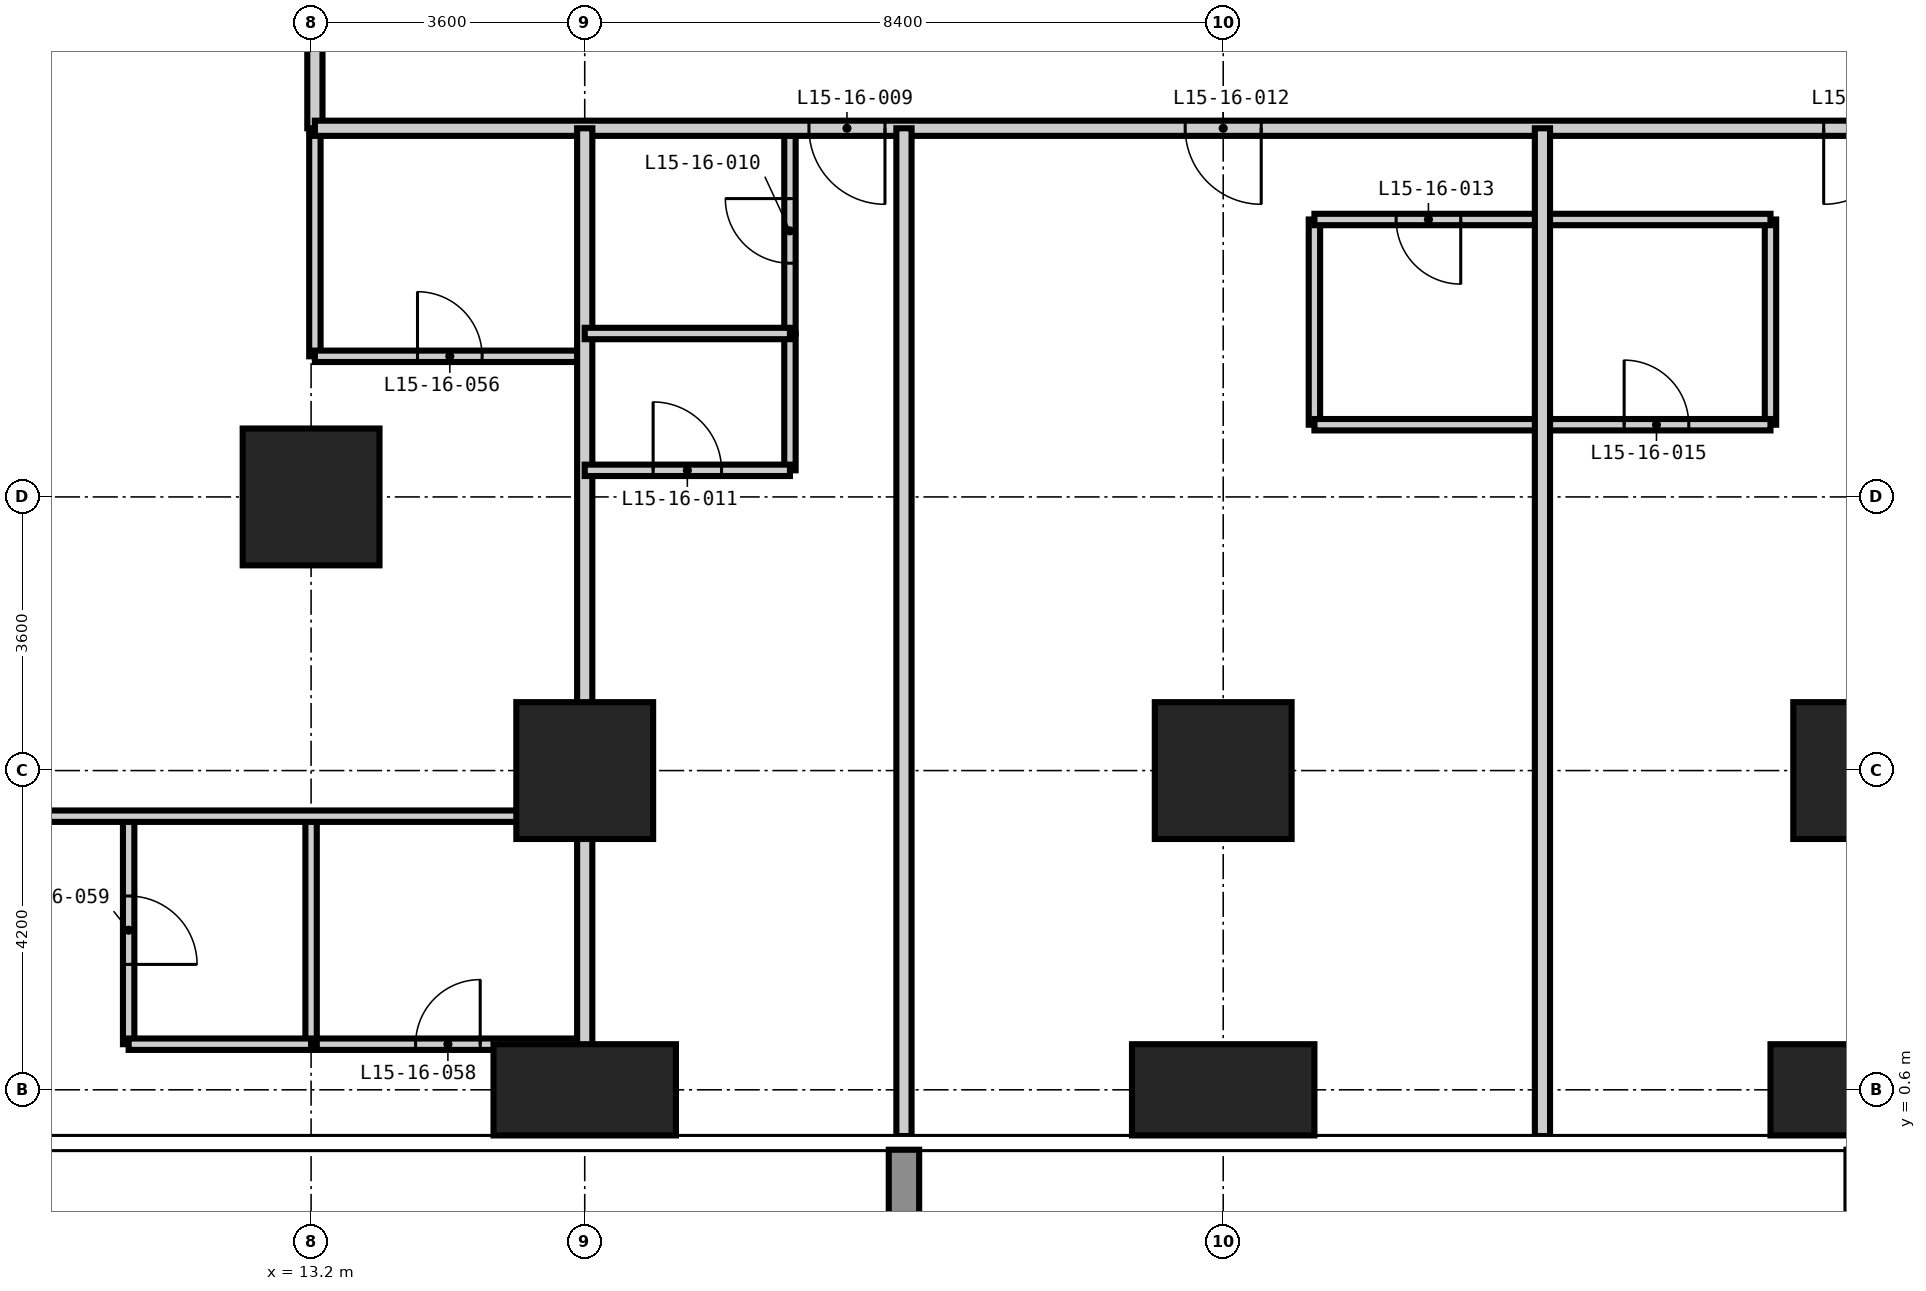
"""IFC4 building model, lengths in metres.
Left out: names, types, materials, properties, quantities, classifications, styles, units other than length and angle.
Written with IfcOpenShell. Run it as: python <this file> out.ifc"""

import sys

from ifc_helpers import new_model, si_unit, direction, frame, frame_2d, origin, origin_2d, place, context, subcontext, project, spatial, rectangle, extrude, element, fill, save


model = new_model("IFC4")
c1 = context("Model", 3, precision=1e-05, world=origin(), true_north=direction((0.0, 1.0)))
c2 = subcontext(c1, "Body", "Model", "MODEL_VIEW")
j1 = project(units=[si_unit("LENGTHUNIT", "METRE"), si_unit("PLANEANGLEUNIT", "RADIAN")], contexts=[c1])
p1 = place(None, origin())
s1 = spatial("IfcSite", under=j1, at=p1, CompositionType="ELEMENT")
p2 = place(p1, origin())
s2 = spatial("IfcBuilding", under=s1, at=p2, CompositionType="ELEMENT")
p3 = place(p2, frame((0.0, 0.0, 63.0)))
s3 = spatial("IfcBuildingStorey", under=s2, at=p3, CompositionType="ELEMENT", Elevation=63.0)
p4 = place(p3, frame((13.2, 8.4, -0.35), z_axis=(0.0, 0.0, 1.0), x_axis=(1.0, 0.0, 0.0)))
e1 = element("IfcColumn", 1, at=p4, inside=s3, PredefinedType="COLUMN", context=c2, shape_type="SweptSolid", body=[
    extrude(rectangle(XDim=1.8, YDim=1.8, at=origin_2d()), origin(), (0.0, 0.0, 1.0), 3.6),
])
p5 = place(p3, frame((16.8, 0.6, -0.35), z_axis=(0.0, 0.0, 1.0), x_axis=(1.0, 0.0, 0.0)))
e2 = element("IfcColumn", 2, at=p5, inside=s3, PredefinedType="COLUMN", context=c2, shape_type="SweptSolid", body=[
    extrude(rectangle(XDim=2.4, YDim=1.2, at=origin_2d()), origin(), (0.0, 0.0, 1.0), 3.6),
])
p6 = place(p3, frame((16.8, 4.8, -0.35), z_axis=(0.0, 0.0, 1.0), x_axis=(1.0, 0.0, 0.0)))
e3 = element("IfcColumn", 3, at=p6, inside=s3, PredefinedType="COLUMN", context=c2, shape_type="SweptSolid", body=[
    extrude(rectangle(XDim=1.8, YDim=1.8, at=origin_2d()), origin(), (0.0, 0.0, 1.0), 3.6),
])
p7 = place(p3, frame((25.2, 0.6, -0.35), z_axis=(0.0, 0.0, 1.0), x_axis=(1.0, 0.0, 0.0)))
e4 = element("IfcColumn", 4, at=p7, inside=s3, PredefinedType="COLUMN", context=c2, shape_type="SweptSolid", body=[
    extrude(rectangle(XDim=2.4, YDim=1.2, at=origin_2d()), origin(), (0.0, 0.0, 1.0), 3.6),
])
p8 = place(p3, frame((25.2, 4.8, -0.35), z_axis=(0.0, 0.0, 1.0), x_axis=(1.0, 0.0, 0.0)))
e5 = element("IfcColumn", 5, at=p8, inside=s3, PredefinedType="COLUMN", context=c2, shape_type="SweptSolid", body=[
    extrude(rectangle(XDim=1.8, YDim=1.8, at=origin_2d()), origin(), (0.0, 0.0, 1.0), 3.6),
])
p9 = place(p3, frame((33.6, 0.6, -0.35), z_axis=(0.0, 0.0, 1.0), x_axis=(1.0, 0.0, 0.0)))
e6 = element("IfcColumn", 6, at=p9, inside=s3, PredefinedType="COLUMN", context=c2, shape_type="SweptSolid", body=[
    extrude(rectangle(XDim=2.4, YDim=1.2, at=origin_2d()), origin(), (0.0, 0.0, 1.0), 3.6),
])
p10 = place(p3, frame((33.6, 4.8, -0.35), z_axis=(0.0, 0.0, 1.0), x_axis=(1.0, 0.0, 0.0)))
e7 = element("IfcColumn", 7, at=p10, inside=s3, PredefinedType="COLUMN", context=c2, shape_type="SweptSolid", body=[
    extrude(rectangle(XDim=1.8, YDim=1.8, at=origin_2d()), origin(), (0.0, 0.0, 1.0), 3.6),
])
p11 = place(p3, frame((13.25, 10.25, 0.0), z_axis=(0.0, 0.0, 1.0), x_axis=(0.0, 1.0, 0.0)))
e8 = element("IfcWall", 8, at=p11, inside=s3, PredefinedType="PARTITIONING", context=c2, shape_type="SweptSolid", body=[
    extrude(rectangle(XDim=3.0, YDim=0.15, at=frame_2d((1.5, 0.0))), origin(), (0.0, 0.0, 1.0), 3.25),
])
p12 = place(p3, frame((19.5, 10.55, 0.0), z_axis=(0.0, 0.0, 1.0), x_axis=(0.0, 1.0, 0.0)))
e9 = element("IfcWall", 9, at=p12, inside=s3, PredefinedType="PARTITIONING", context=c2, shape_type="SweptSolid", body=[
    extrude(rectangle(XDim=2.7, YDim=0.15, at=frame_2d((1.35, 0.0))), origin(), (0.0, 0.0, 1.0), 3.25),
])
p13 = place(p12, frame((0.925, 0.0, 0.0)))
e10 = element("IfcOpeningElement", 10, at=p13, cuts=e9, PredefinedType="OPENING", context=c2, shape_type="SweptSolid", body=[
    extrude(rectangle(XDim=0.85, YDim=2.1, at=frame_2d((0.425, 1.05))), frame((0.0, 0.085, 0.0), z_axis=(0.0, -1.0, 0.0), x_axis=(1.0, 0.0, 0.0)), (0.0, 0.0, 1.0), 0.17),
])
for number, where, z_axis, x_axis in (
    (11, (26.4, 9.35, 0.0), (0.0, 0.0, 1.0), (0.0, 1.0, 0.0)),
    (12, (32.4, 9.35, 0.0), (0.0, 0.0, 1.0), (0.0, 1.0, 0.0)),
):
    element("IfcWall", number, at=place(p3, frame(where, z_axis=z_axis, x_axis=x_axis)), inside=s3, PredefinedType="PARTITIONING", context=c2, shape_type="SweptSolid", body=[
        extrude(rectangle(XDim=2.7, YDim=0.15, at=frame_2d((1.35, 0.0))), origin(), (0.0, 0.0, 1.0), 3.25),
    ])
p14 = place(p3, frame((13.2, 1.2, 0.0), z_axis=(0.0, 0.0, 1.0), x_axis=(1.0, 0.0, 0.0)))
e13 = element("IfcWall", 13, at=p14, inside=s3, PredefinedType="PARTITIONING", context=c2, shape_type="SweptSolid", body=[
    extrude(rectangle(XDim=3.6, YDim=0.15, at=frame_2d((1.8, 0.0))), origin(), (0.0, 0.0, 1.0), 3.25),
])
p15 = place(p14, frame((1.375, 0.0, 0.0)))
e14 = element("IfcOpeningElement", 14, at=p15, cuts=e13, PredefinedType="OPENING", context=c2, shape_type="SweptSolid", body=[
    extrude(rectangle(XDim=0.85, YDim=2.1, at=frame_2d((0.425, 1.05))), frame((0.0, 0.085, 0.0), z_axis=(0.0, -1.0, 0.0), x_axis=(1.0, 0.0, 0.0)), (0.0, 0.0, 1.0), 0.17),
])
p16 = place(p3, frame((26.4, 9.35, 0.0), z_axis=(0.0, 0.0, 1.0), x_axis=(1.0, 0.0, 0.0)))
e15 = element("IfcWall", 15, at=p16, inside=s3, PredefinedType="PARTITIONING", context=c2, shape_type="SweptSolid", body=[
    extrude(rectangle(XDim=6.0, YDim=0.15, at=frame_2d((3.0, 0.0))), origin(), (0.0, 0.0, 1.0), 3.25),
])
p17 = place(p16, frame((4.075, 0.0, 0.0)))
e16 = element("IfcOpeningElement", 16, at=p17, cuts=e15, PredefinedType="OPENING", context=c2, shape_type="SweptSolid", body=[
    extrude(rectangle(XDim=0.85, YDim=2.1, at=frame_2d((0.425, 1.05))), frame((0.0, 0.085, 0.0), z_axis=(0.0, -1.0, 0.0), x_axis=(1.0, 0.0, 0.0)), (0.0, 0.0, 1.0), 0.17),
])
p18 = place(p3, frame((13.25, 10.25, 0.0), z_axis=(0.0, 0.0, 1.0), x_axis=(1.0, 0.0, 0.0)))
e17 = element("IfcWall", 17, at=p18, inside=s3, PredefinedType="PARTITIONING", context=c2, shape_type="SweptSolid", body=[
    extrude(rectangle(XDim=3.55, YDim=0.15, at=frame_2d((1.775, 0.0))), origin(), (0.0, 0.0, 1.0), 3.25),
])
p19 = place(p18, frame((1.35, 0.0, 0.0)))
e18 = element("IfcOpeningElement", 18, at=p19, cuts=e17, PredefinedType="OPENING", context=c2, shape_type="SweptSolid", body=[
    extrude(rectangle(XDim=0.85, YDim=2.1, at=frame_2d((0.425, 1.05))), frame((0.0, 0.085, 0.0), z_axis=(0.0, -1.0, 0.0), x_axis=(1.0, 0.0, 0.0)), (0.0, 0.0, 1.0), 0.17),
])
p20 = place(p3, frame((26.4, 12.05, 0.0), z_axis=(0.0, 0.0, 1.0), x_axis=(1.0, 0.0, 0.0)))
e19 = element("IfcWall", 19, at=p20, inside=s3, PredefinedType="PARTITIONING", context=c2, shape_type="SweptSolid", body=[
    extrude(rectangle(XDim=6.0, YDim=0.15, at=frame_2d((3.0, 0.0))), origin(), (0.0, 0.0, 1.0), 3.25),
])
p21 = place(p20, frame((1.075, 0.0, 0.0)))
e20 = element("IfcOpeningElement", 20, at=p21, cuts=e19, PredefinedType="OPENING", context=c2, shape_type="SweptSolid", body=[
    extrude(rectangle(XDim=0.85, YDim=2.1, at=frame_2d((0.425, 1.05))), frame((0.0, 0.085, 0.0), z_axis=(0.0, -1.0, 0.0), x_axis=(1.0, 0.0, 0.0)), (0.0, 0.0, 1.0), 0.17),
])
p22 = place(p3, frame((13.25, 13.25, 0.0), z_axis=(0.0, 0.0, 1.0), x_axis=(0.0, 1.0, 0.0)))
e21 = element("IfcWall", 21, at=p22, inside=s3, PredefinedType="PARTITIONING", context=c2, shape_type="SweptSolid", body=[
    extrude(rectangle(XDim=31.7, YDim=0.2, at=frame_2d((15.85, 0.0))), origin(), (0.0, 0.0, 1.0), 3.25),
])
p23 = place(p22, frame((7.25, 0.0, 0.0)))
e22 = element("IfcOpeningElement", 22, at=p23, cuts=e21, PredefinedType="OPENING", context=c2, shape_type="SweptSolid", body=[
    extrude(rectangle(XDim=1.0, YDim=2.2, at=frame_2d((0.5, 1.1))), frame((0.0, 0.11, 0.0), z_axis=(0.0, -1.0, 0.0), x_axis=(1.0, 0.0, 0.0)), (0.0, 0.0, 1.0), 0.22),
])
p24 = place(p22, frame((15.65, 0.0, 0.0)))
e23 = element("IfcOpeningElement", 23, at=p24, cuts=e21, PredefinedType="OPENING", context=c2, shape_type="SweptSolid", body=[
    extrude(rectangle(XDim=1.0, YDim=2.2, at=frame_2d((0.5, 1.1))), frame((0.0, 0.11, 0.0), z_axis=(0.0, -1.0, 0.0), x_axis=(1.0, 0.0, 0.0)), (0.0, 0.0, 1.0), 0.22),
])
p25 = place(p22, frame((24.05, 0.0, 0.0)))
e24 = element("IfcOpeningElement", 24, at=p25, cuts=e21, PredefinedType="OPENING", context=c2, shape_type="SweptSolid", body=[
    extrude(rectangle(XDim=1.0, YDim=2.2, at=frame_2d((0.5, 1.1))), frame((0.0, 0.11, 0.0), z_axis=(0.0, -1.0, 0.0), x_axis=(1.0, 0.0, 0.0)), (0.0, 0.0, 1.0), 0.22),
])
p26 = place(p22, frame((1.275, 0.0, 0.0)))
e25 = element("IfcOpeningElement", 25, at=p26, cuts=e21, PredefinedType="OPENING", context=c2, shape_type="SweptSolid", body=[
    extrude(rectangle(XDim=1.0, YDim=2.2, at=frame_2d((0.5, 1.1))), frame((0.0, 0.11, 0.0), z_axis=(0.0, -1.0, 0.0), x_axis=(1.0, 0.0, 0.0)), (0.0, 0.0, 1.0), 0.22),
])
p27 = place(p22, frame((29.725, 0.0, 0.0)))
e26 = element("IfcOpeningElement", 26, at=p27, cuts=e21, PredefinedType="OPENING", context=c2, shape_type="SweptSolid", body=[
    extrude(rectangle(XDim=1.0, YDim=2.2, at=frame_2d((0.5, 1.1))), frame((0.0, 0.11, 0.0), z_axis=(0.0, -1.0, 0.0), x_axis=(1.0, 0.0, 0.0)), (0.0, 0.0, 1.0), 0.22),
])
p28 = place(p3, frame((46.15, 13.25, 0.0), z_axis=(0.0, 0.0, 1.0), x_axis=(-1.0, 0.0, 0.0)))
e27 = element("IfcWall", 27, at=p28, inside=s3, PredefinedType="PARTITIONING", context=c2, shape_type="SweptSolid", body=[
    extrude(rectangle(XDim=32.9, YDim=0.2, at=frame_2d((16.45, 0.0))), origin(), (0.0, 0.0, 1.0), 3.25),
])
p29 = place(p28, frame((25.4, 0.0, 0.0)))
e28 = element("IfcOpeningElement", 28, at=p29, cuts=e27, PredefinedType="OPENING", context=c2, shape_type="SweptSolid", body=[
    extrude(rectangle(XDim=1.0, YDim=2.2, at=frame_2d((0.5, 1.1))), frame((0.0, 0.11, 0.0), z_axis=(0.0, -1.0, 0.0), x_axis=(1.0, 0.0, 0.0)), (0.0, 0.0, 1.0), 0.22),
])
p30 = place(p28, frame((20.45, 0.0, 0.0)))
e29 = element("IfcOpeningElement", 29, at=p30, cuts=e27, PredefinedType="OPENING", context=c2, shape_type="SweptSolid", body=[
    extrude(rectangle(XDim=1.0, YDim=2.2, at=frame_2d((0.5, 1.1))), frame((0.0, 0.11, 0.0), z_axis=(0.0, -1.0, 0.0), x_axis=(1.0, 0.0, 0.0)), (0.0, 0.0, 1.0), 0.22),
])
p31 = place(p28, frame((12.05, 0.0, 0.0)))
e30 = element("IfcOpeningElement", 30, at=p31, cuts=e27, PredefinedType="OPENING", context=c2, shape_type="SweptSolid", body=[
    extrude(rectangle(XDim=1.0, YDim=2.2, at=frame_2d((0.5, 1.1))), frame((0.0, 0.11, 0.0), z_axis=(0.0, -1.0, 0.0), x_axis=(1.0, 0.0, 0.0)), (0.0, 0.0, 1.0), 0.22),
])
p32 = place(p28, frame((7.1, 0.0, 0.0)))
e31 = element("IfcOpeningElement", 31, at=p32, cuts=e27, PredefinedType="OPENING", context=c2, shape_type="SweptSolid", body=[
    extrude(rectangle(XDim=1.0, YDim=2.2, at=frame_2d((0.5, 1.1))), frame((0.0, 0.11, 0.0), z_axis=(0.0, -1.0, 0.0), x_axis=(1.0, 0.0, 0.0)), (0.0, 0.0, 1.0), 0.22),
])
for number, where, z_axis, x_axis in (
    (32, (16.8, -0.008, 0.0), (0.0, 0.0, 1.0), (0.0, 1.0, 0.0)),
    (33, (21.0, -0.008, 0.0), (0.0, 0.0, 1.0), (0.0, 1.0, 0.0)),
    (34, (29.4, -0.008, 0.0), (0.0, 0.0, 1.0), (0.0, 1.0, 0.0)),
):
    element("IfcWall", number, at=place(p3, frame(where, z_axis=z_axis, x_axis=x_axis)), inside=s3, PredefinedType="PARTITIONING", context=c2, shape_type="SweptSolid", body=[
        extrude(rectangle(XDim=13.258, YDim=0.2, at=frame_2d((6.629, 0.0))), origin(), (0.0, 0.0, 1.0), 3.25),
    ])
p33 = place(p3, frame((10.8, 1.2, 0.0), z_axis=(0.0, 0.0, 1.0), x_axis=(0.0, 1.0, 0.0)))
e35 = element("IfcWall", 35, at=p33, inside=s3, PredefinedType="PARTITIONING", context=c2, shape_type="SweptSolid", body=[
    extrude(rectangle(XDim=3.0, YDim=0.15, at=frame_2d((1.5, 0.0))), origin(), (0.0, 0.0, 1.0), 3.25),
])
p34 = place(p33, frame((1.05, 0.0, 0.0)))
e36 = element("IfcOpeningElement", 36, at=p34, cuts=e35, PredefinedType="OPENING", context=c2, shape_type="SweptSolid", body=[
    extrude(rectangle(XDim=0.9, YDim=2.1, at=frame_2d((0.45, 1.05))), frame((0.0, 0.085, 0.0), z_axis=(0.0, -1.0, 0.0), x_axis=(1.0, 0.0, 0.0)), (0.0, 0.0, 1.0), 0.17),
])
p35 = place(p3, frame((13.2, 1.2, 0.0), z_axis=(0.0, 0.0, 1.0), x_axis=(0.0, 1.0, 0.0)))
e37 = element("IfcWall", 37, at=p35, inside=s3, PredefinedType="PARTITIONING", context=c2, shape_type="SweptSolid", body=[
    extrude(rectangle(XDim=3.0, YDim=0.15, at=frame_2d((1.5, 0.0))), origin(), (0.0, 0.0, 1.0), 3.25),
])
p36 = place(p3, frame((19.5, 8.75, 0.0), z_axis=(0.0, 0.0, 1.0), x_axis=(0.0, 1.0, 0.0)))
e38 = element("IfcWall", 38, at=p36, inside=s3, PredefinedType="PARTITIONING", context=c2, shape_type="SweptSolid", body=[
    extrude(rectangle(XDim=1.8, YDim=0.15, at=frame_2d((0.9, 0.0))), origin(), (0.0, 0.0, 1.0), 3.25),
])
p37 = place(p3, frame((10.8, 1.2, 0.0), z_axis=(0.0, 0.0, 1.0), x_axis=(1.0, 0.0, 0.0)))
e39 = element("IfcWall", 39, at=p37, inside=s3, PredefinedType="PARTITIONING", context=c2, shape_type="SweptSolid", body=[
    extrude(rectangle(XDim=2.4, YDim=0.15, at=frame_2d((1.2, 0.0))), origin(), (0.0, 0.0, 1.0), 3.25),
])
p38 = place(p3, frame((-0.008, 4.2, 0.0), z_axis=(0.0, 0.0, 1.0), x_axis=(1.0, 0.0, 0.0)))
e40 = element("IfcWall", 40, at=p38, inside=s3, PredefinedType="PARTITIONING", context=c2, shape_type="SweptSolid", body=[
    extrude(rectangle(XDim=16.808, YDim=0.15, at=frame_2d((8.404, 0.0))), origin(), (0.0, 0.0, 1.0), 3.25),
])
p39 = place(p38, frame((4.958, 0.0, 0.0)))
e41 = element("IfcOpeningElement", 41, at=p39, cuts=e40, PredefinedType="OPENING", context=c2, shape_type="SweptSolid", body=[
    extrude(rectangle(XDim=0.9, YDim=2.1, at=frame_2d((0.45, 1.05))), frame((0.0, 0.085, 0.0), z_axis=(0.0, -1.0, 0.0), x_axis=(1.0, 0.0, 0.0)), (0.0, 0.0, 1.0), 0.17),
])
p40 = place(p3, frame((16.8, 8.75, 0.0), z_axis=(0.0, 0.0, 1.0), x_axis=(1.0, 0.0, 0.0)))
e42 = element("IfcWall", 42, at=p40, inside=s3, PredefinedType="PARTITIONING", context=c2, shape_type="SweptSolid", body=[
    extrude(rectangle(XDim=2.7, YDim=0.15, at=frame_2d((1.35, 0.0))), origin(), (0.0, 0.0, 1.0), 3.25),
])
p41 = place(p40, frame((0.9, 0.0, 0.0)))
e43 = element("IfcOpeningElement", 43, at=p41, cuts=e42, PredefinedType="OPENING", context=c2, shape_type="SweptSolid", body=[
    extrude(rectangle(XDim=0.9, YDim=2.1, at=frame_2d((0.45, 1.05))), frame((0.0, 0.085, 0.0), z_axis=(0.0, -1.0, 0.0), x_axis=(1.0, 0.0, 0.0)), (0.0, 0.0, 1.0), 0.17),
])
p42 = place(p3, frame((16.8, 10.55, 0.0), z_axis=(0.0, 0.0, 1.0), x_axis=(1.0, 0.0, 0.0)))
e44 = element("IfcWall", 44, at=p42, inside=s3, PredefinedType="PARTITIONING", context=c2, shape_type="SweptSolid", body=[
    extrude(rectangle(XDim=2.7, YDim=0.15, at=frame_2d((1.35, 0.0))), origin(), (0.0, 0.0, 1.0), 3.25),
])
p43 = place(p29, origin())
e45 = element("IfcDoor", 45, at=p43, inside=s3, OperationType="SINGLE_SWING_LEFT", PredefinedType="DOOR", context=c2, shape_type="SweptSolid", body=[
    extrude(rectangle(XDim=1.0, YDim=2.2, at=frame_2d((0.5, 1.1))), frame((0.0, 0.025, 0.0), z_axis=(0.0, -1.0, 0.0), x_axis=(1.0, 0.0, 0.0)), (0.0, 0.0, 1.0), 0.05),
])
fill(e28, e45)
p44 = place(p13, origin())
e46 = element("IfcDoor", 46, at=p44, inside=s3, OperationType="SINGLE_SWING_RIGHT", PredefinedType="DOOR", context=c2, shape_type="SweptSolid", body=[
    extrude(rectangle(XDim=0.85, YDim=2.1, at=frame_2d((0.425, 1.05))), frame((0.0, 0.025, 0.0), z_axis=(0.0, -1.0, 0.0), x_axis=(1.0, 0.0, 0.0)), (0.0, 0.0, 1.0), 0.05),
])
fill(e10, e46)
p45 = place(p41, origin())
e47 = element("IfcDoor", 47, at=p45, inside=s3, OperationType="SINGLE_SWING_LEFT", PredefinedType="DOOR", context=c2, shape_type="SweptSolid", body=[
    extrude(rectangle(XDim=0.9, YDim=2.1, at=frame_2d((0.45, 1.05))), frame((0.0, 0.025, 0.0), z_axis=(0.0, -1.0, 0.0), x_axis=(1.0, 0.0, 0.0)), (0.0, 0.0, 1.0), 0.05),
])
fill(e43, e47)
p46 = place(p30, origin())
e48 = element("IfcDoor", 48, at=p46, inside=s3, OperationType="SINGLE_SWING_LEFT", PredefinedType="DOOR", context=c2, shape_type="SweptSolid", body=[
    extrude(rectangle(XDim=1.0, YDim=2.2, at=frame_2d((0.5, 1.1))), frame((0.0, 0.025, 0.0), z_axis=(0.0, -1.0, 0.0), x_axis=(1.0, 0.0, 0.0)), (0.0, 0.0, 1.0), 0.05),
])
fill(e29, e48)
p47 = place(p21, frame((0.85, 0.0, 0.0), z_axis=(0.0, 0.0, 1.0), x_axis=(-1.0, 0.0, 0.0)))
e49 = element("IfcDoor", 49, at=p47, inside=s3, OperationType="SINGLE_SWING_LEFT", PredefinedType="DOOR", context=c2, shape_type="SweptSolid", body=[
    extrude(rectangle(XDim=0.85, YDim=2.1, at=frame_2d((0.425, 1.05))), frame((0.0, 0.025, 0.0), z_axis=(0.0, -1.0, 0.0), x_axis=(1.0, 0.0, 0.0)), (0.0, 0.0, 1.0), 0.05),
])
fill(e20, e49)
p48 = place(p31, origin())
e50 = element("IfcDoor", 50, at=p48, inside=s3, OperationType="SINGLE_SWING_RIGHT", PredefinedType="DOOR", context=c2, shape_type="SweptSolid", body=[
    extrude(rectangle(XDim=1.0, YDim=2.2, at=frame_2d((0.5, 1.1))), frame((0.0, 0.025, 0.0), z_axis=(0.0, -1.0, 0.0), x_axis=(1.0, 0.0, 0.0)), (0.0, 0.0, 1.0), 0.05),
])
fill(e30, e50)
p49 = place(p17, origin())
e51 = element("IfcDoor", 51, at=p49, inside=s3, OperationType="SINGLE_SWING_LEFT", PredefinedType="DOOR", context=c2, shape_type="SweptSolid", body=[
    extrude(rectangle(XDim=0.85, YDim=2.1, at=frame_2d((0.425, 1.05))), frame((0.0, 0.025, 0.0), z_axis=(0.0, -1.0, 0.0), x_axis=(1.0, 0.0, 0.0)), (0.0, 0.0, 1.0), 0.05),
])
fill(e16, e51)
p50 = place(p19, origin())
e52 = element("IfcDoor", 52, at=p50, inside=s3, OperationType="SINGLE_SWING_LEFT", PredefinedType="DOOR", context=c2, shape_type="SweptSolid", body=[
    extrude(rectangle(XDim=0.85, YDim=2.1, at=frame_2d((0.425, 1.05))), frame((0.0, 0.025, 0.0), z_axis=(0.0, -1.0, 0.0), x_axis=(1.0, 0.0, 0.0)), (0.0, 0.0, 1.0), 0.05),
])
fill(e18, e52)
p51 = place(p15, origin())
e53 = element("IfcDoor", 53, at=p51, inside=s3, OperationType="SINGLE_SWING_RIGHT", PredefinedType="DOOR", context=c2, shape_type="SweptSolid", body=[
    extrude(rectangle(XDim=0.85, YDim=2.1, at=frame_2d((0.425, 1.05))), frame((0.0, 0.025, 0.0), z_axis=(0.0, -1.0, 0.0), x_axis=(1.0, 0.0, 0.0)), (0.0, 0.0, 1.0), 0.05),
])
fill(e14, e53)
p52 = place(p34, frame((0.9, 0.0, 0.0), z_axis=(0.0, 0.0, 1.0), x_axis=(-1.0, 0.0, 0.0)))
e54 = element("IfcDoor", 54, at=p52, inside=s3, OperationType="SINGLE_SWING_RIGHT", PredefinedType="DOOR", context=c2, shape_type="SweptSolid", body=[
    extrude(rectangle(XDim=0.9, YDim=2.1, at=frame_2d((0.45, 1.05))), frame((0.0, 0.025, 0.0), z_axis=(0.0, -1.0, 0.0), x_axis=(1.0, 0.0, 0.0)), (0.0, 0.0, 1.0), 0.05),
])
fill(e36, e54)
save(model, sys.argv[1])
